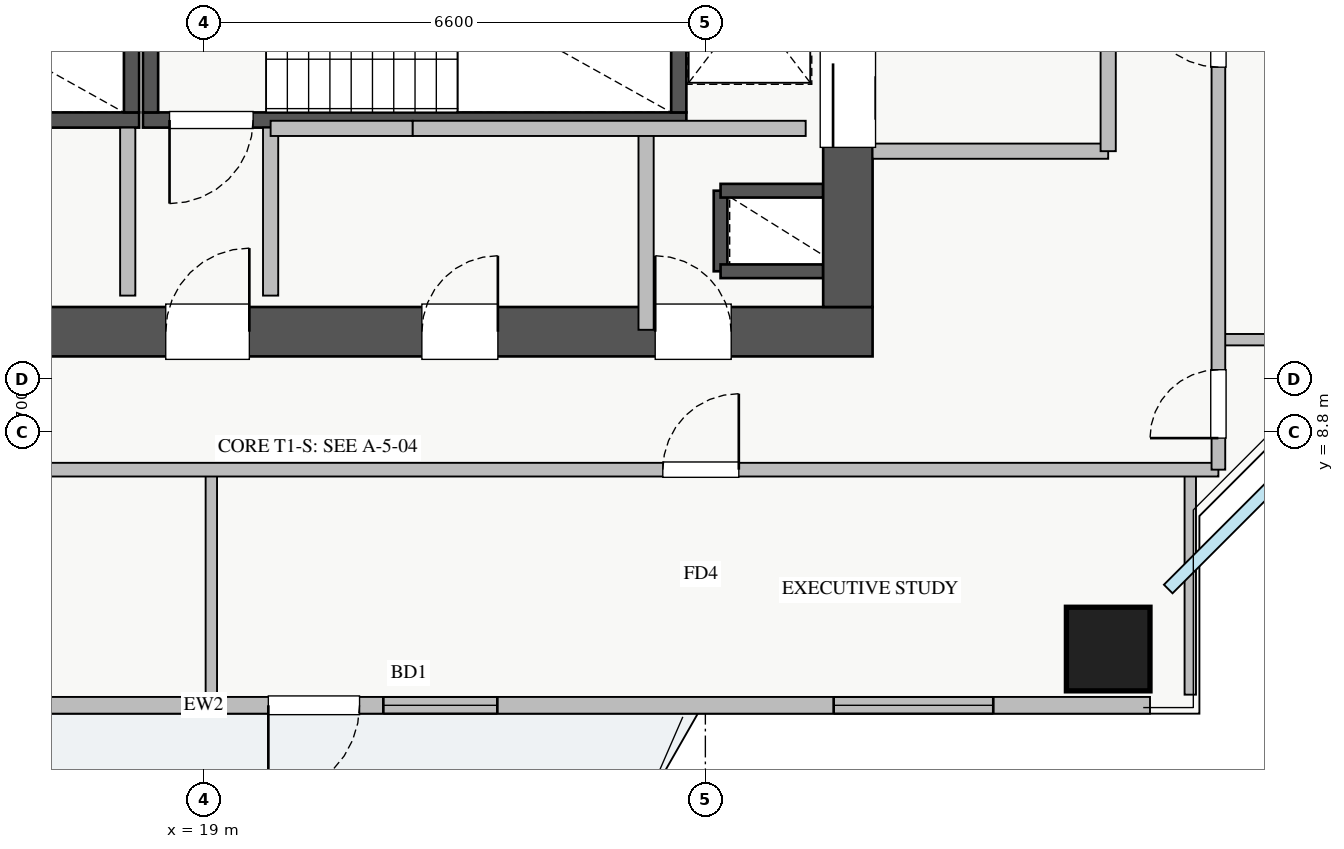
"""IFC4 building model, lengths in metres.
Left out: names, types, materials, properties, quantities, classifications, styles, units other than length and angle.
Written with IfcOpenShell. Run it as: python <this file> out.ifc"""

import sys

from ifc_helpers import new_model, si_unit, direction, frame, frame_2d, origin, origin_2d, place, context, subcontext, project, spatial, rectangle, extrude, source, transform, mapped, element, fill, save


model = new_model("IFC4")
c1 = context("Model", 3, precision=1e-05, world=origin(), true_north=direction((0.0, 1.0)))
c2 = subcontext(c1, "Body", "Model", "MODEL_VIEW")
j1 = project(units=[si_unit("LENGTHUNIT", "METRE"), si_unit("PLANEANGLEUNIT", "RADIAN")], contexts=[c1])
p1 = place(None, origin())
s1 = spatial("IfcSite", under=j1, at=p1, CompositionType="ELEMENT")
p2 = place(p1, origin())
s2 = spatial("IfcBuilding", under=s1, at=p2, CompositionType="ELEMENT")
p3 = place(p2, frame((0.0, 0.0, 126.25)))
s3 = spatial("IfcBuildingStorey", under=s2, at=p3, CompositionType="ELEMENT", Elevation=126.25)
p4 = place(p3, frame((25.8, 10.92, 0.0), z_axis=(0.0, 0.0, 1.0), x_axis=(0.0, 1.0, 0.0)))
e1 = element("IfcWall", 1, at=p4, inside=s3, PredefinedType="SHEAR", context=c2, shape_type="SweptSolid", body=[
    extrude(rectangle(XDim=1.06, YDim=0.18, at=frame_2d((0.53, 0.0))), origin(), (0.0, 0.0, 1.0), 3.07),
])
for number, where, z_axis, x_axis in (
    (2, (25.8, 11.98, 0.0), (0.0, 0.0, 1.0), (1.0, 0.0, 0.0)),
    (3, (25.8, 10.92, 0.0), (0.0, 0.0, 1.0), (1.0, 0.0, 0.0)),
):
    element("IfcWall", number, at=place(p3, frame(where, z_axis=z_axis, x_axis=x_axis)), inside=s3, PredefinedType="SHEAR", context=c2, shape_type="SweptSolid", body=[
        extrude(rectangle(XDim=1.35, YDim=0.18, at=frame_2d((0.675, 0.0))), origin(), (0.0, 0.0, 1.0), 3.07),
    ])
p5 = place(p3, frame((10.85, 12.91, 0.0), z_axis=(0.0, 0.0, 1.0), x_axis=(1.0, 0.0, 0.0)))
e4 = element("IfcWall", 4, at=p5, inside=s3, PredefinedType="SHEAR", context=c2, shape_type="SweptSolid", body=[
    extrude(rectangle(XDim=7.3, YDim=0.2, at=frame_2d((3.65, 0.0))), origin(), (0.0, 0.0, 1.0), 3.25),
])
p6 = place(p5, frame((0.35, 0.0, 0.0)))
e5 = element("IfcOpeningElement", 5, at=p6, cuts=e4, PredefinedType="OPENING", context=c2, shape_type="SweptSolid", body=[
    extrude(rectangle(XDim=1.1, YDim=2.05, at=frame_2d((0.55, 1.025))), frame((0.0, 0.11, 0.0), z_axis=(0.0, -1.0, 0.0), x_axis=(1.0, 0.0, 0.0)), (0.0, 0.0, 1.0), 0.22),
])
p7 = place(p3, frame((18.05, 13.01, 0.0), z_axis=(0.0, 0.0, 1.0), x_axis=(0.0, 1.0, 0.0)))
e6 = element("IfcWall", 6, at=p7, inside=s3, PredefinedType="SHEAR", context=c2, shape_type="SweptSolid", body=[
    extrude(rectangle(XDim=2.94, YDim=0.2, at=frame_2d((1.47, 0.0))), origin(), (0.0, 0.0, 1.0), 3.25),
])
p8 = place(p3, frame((18.2, 12.91, 0.0), z_axis=(0.0, 0.0, 1.0), x_axis=(1.0, 0.0, 0.0)))
e7 = element("IfcWall", 7, at=p8, inside=s3, PredefinedType="SHEAR", context=c2, shape_type="SweptSolid", body=[
    extrude(rectangle(XDim=7.15, YDim=0.2, at=frame_2d((3.575, 0.0))), origin(), (0.0, 0.0, 1.0), 3.25),
])
p9 = place(p8, frame((0.35, 0.0, 0.0)))
e8 = element("IfcOpeningElement", 8, at=p9, cuts=e7, PredefinedType="OPENING", context=c2, shape_type="SweptSolid", body=[
    extrude(rectangle(XDim=1.1, YDim=2.05, at=frame_2d((0.55, 1.025))), frame((0.0, 0.11, 0.0), z_axis=(0.0, -1.0, 0.0), x_axis=(1.0, 0.0, 0.0)), (0.0, 0.0, 1.0), 0.22),
])
for number, where, z_axis, x_axis in (
    (9, (18.3, 13.01, 0.0), (0.0, 0.0, 1.0), (0.0, 1.0, 0.0)),
    (10, (25.25, 13.01, 0.0), (0.0, 0.0, 1.0), (0.0, 1.0, 0.0)),
):
    element("IfcWall", number, at=place(p3, frame(where, z_axis=z_axis, x_axis=x_axis)), inside=s3, PredefinedType="SHEAR", context=c2, shape_type="SweptSolid", body=[
        extrude(rectangle(XDim=2.94, YDim=0.2, at=frame_2d((1.47, 0.0))), origin(), (0.0, 0.0, 1.0), 3.25),
    ])
p10 = place(p3, frame((10.2, 10.125, 0.0), z_axis=(0.0, 0.0, 1.0), x_axis=(1.0, 0.0, 0.0)))
e11 = element("IfcWall", 11, at=p10, inside=s3, PredefinedType="SHEAR", context=c2, shape_type="SweptSolid", body=[
    extrude(rectangle(XDim=17.6, YDim=0.65, at=frame_2d((8.8, 0.0))), origin(), (0.0, 0.0, 1.0), 3.25),
])
p11 = place(p10, frame((1.15, 0.0, 0.0)))
e12 = element("IfcOpeningElement", 12, at=p11, cuts=e11, PredefinedType="OPENING", context=c2, shape_type="SweptSolid", body=[
    extrude(rectangle(XDim=1.1, YDim=2.05, at=frame_2d((0.55, 1.025))), frame((0.0, 0.335, 0.0), z_axis=(0.0, -1.0, 0.0), x_axis=(1.0, 0.0, 0.0)), (0.0, 0.0, 1.0), 0.67),
])
p12 = place(p10, frame((8.3, 0.0, 0.0)))
e13 = element("IfcOpeningElement", 13, at=p12, cuts=e11, PredefinedType="OPENING", context=c2, shape_type="SweptSolid", body=[
    extrude(rectangle(XDim=1.1, YDim=2.05, at=frame_2d((0.55, 1.025))), frame((0.0, 0.335, 0.0), z_axis=(0.0, -1.0, 0.0), x_axis=(1.0, 0.0, 0.0)), (0.0, 0.0, 1.0), 0.67),
])
p13 = place(p10, frame((4.9, 0.0, 0.0)))
e14 = element("IfcOpeningElement", 14, at=p13, cuts=e11, PredefinedType="OPENING", context=c2, shape_type="SweptSolid", body=[
    extrude(rectangle(XDim=1.1, YDim=2.05, at=frame_2d((0.55, 1.025))), frame((0.0, 0.335, 0.0), z_axis=(0.0, -1.0, 0.0), x_axis=(1.0, 0.0, 0.0)), (0.0, 0.0, 1.0), 0.67),
])
p14 = place(p10, frame((14.74, 0.0, 0.0)))
e15 = element("IfcOpeningElement", 15, at=p14, cuts=e11, PredefinedType="OPENING", context=c2, shape_type="SweptSolid", body=[
    extrude(rectangle(XDim=1.0, YDim=2.05, at=frame_2d((0.5, 1.025))), frame((0.0, 0.335, 0.0), z_axis=(0.0, -1.0, 0.0), x_axis=(1.0, 0.0, 0.0)), (0.0, 0.0, 1.0), 0.67),
])
p15 = place(p10, frame((11.67, 0.0, 0.0)))
e16 = element("IfcOpeningElement", 16, at=p15, cuts=e11, PredefinedType="OPENING", context=c2, shape_type="SweptSolid", body=[
    extrude(rectangle(XDim=1.0, YDim=2.05, at=frame_2d((0.5, 1.025))), frame((0.0, 0.335, 0.0), z_axis=(0.0, -1.0, 0.0), x_axis=(1.0, 0.0, 0.0)), (0.0, 0.0, 1.0), 0.67),
])
p16 = place(p3, frame((27.475, 10.45, 0.0), z_axis=(0.0, 0.0, 1.0), x_axis=(0.0, 1.0, 0.0)))
e17 = element("IfcWall", 17, at=p16, inside=s3, PredefinedType="SHEAR", context=c2, shape_type="SweptSolid", body=[
    extrude(rectangle(XDim=5.9, YDim=0.65, at=frame_2d((2.95, 0.0))), origin(), (0.0, 0.0, 1.0), 3.25),
])
p17 = place(p16, frame((2.1, 0.0, 0.0)))
e18 = element("IfcOpeningElement", 18, at=p17, cuts=e17, PredefinedType="OPENING", context=c2, shape_type="SweptSolid", body=[
    extrude(rectangle(XDim=1.3, YDim=2.05, at=frame_2d((0.65, 1.025))), frame((0.0, 0.335, 0.0), z_axis=(0.0, -1.0, 0.0), x_axis=(1.0, 0.0, 0.0)), (0.0, 0.0, 1.0), 0.67),
])
m1 = source(origin(), c2, "Body", "SweptSolid", [
    extrude(rectangle(XDim=1.1, YDim=1.1, at=origin_2d()), origin(), (0.0, 0.0, 1.0), 3.25),
])
p18 = place(p3, frame((30.9, 5.95, 0.0), z_axis=(0.0, 0.0, 1.0), x_axis=(1.0, 0.0, 0.0)))
e19 = element("IfcColumn", 19, at=p18, inside=s3, PredefinedType="COLUMN", context=c2, shape_type="MappedRepresentation", body=[
    mapped(m1, transform((0.0, 0.0, 0.0), x_axis=(1.0, 0.0, 0.0), y_axis=(0.0, 1.0, 0.0), z_axis=(0.0, 0.0, 1.0), scale=1.0)),
])
p19 = place(p3, frame((6.55, 5.21, 0.0), z_axis=(0.0, 0.0, 1.0), x_axis=(1.0, 0.0, 0.0)))
e20 = element("IfcWall", 20, at=p19, inside=s3, PredefinedType="STANDARD", context=c2, shape_type="SweptSolid", body=[
    extrude(rectangle(XDim=24.9, YDim=0.22, at=frame_2d((12.45, 0.0))), origin(), (0.0, 0.0, 1.0), 2.61),
])
p20 = place(p19, frame((13.3, 0.0, 0.0)))
e21 = element("IfcOpeningElement", 21, at=p20, cuts=e20, PredefinedType="OPENING", context=c2, shape_type="SweptSolid", body=[
    extrude(rectangle(XDim=1.2, YDim=2.1, at=frame_2d((0.6, 1.05))), frame((0.0, 0.12, 0.0), z_axis=(0.0, -1.0, 0.0), x_axis=(1.0, 0.0, 0.0)), (0.0, 0.0, 1.0), 0.24),
])
p21 = place(p19, frame((0.343, 0.0, 0.9)))
e22 = element("IfcOpeningElement", 22, at=p21, cuts=e20, PredefinedType="OPENING", context=c2, shape_type="SweptSolid", body=[
    extrude(rectangle(XDim=1.5, YDim=1.5, at=frame_2d((0.75, 0.75))), frame((0.0, 0.12, 0.0), z_axis=(0.0, -1.0, 0.0), x_axis=(1.0, 0.0, 0.0)), (0.0, 0.0, 1.0), 0.24),
])
p22 = place(p19, frame((8.438, 0.0, 0.9)))
e23 = element("IfcOpeningElement", 23, at=p22, cuts=e20, PredefinedType="OPENING", context=c2, shape_type="SweptSolid", body=[
    extrude(rectangle(XDim=1.8, YDim=1.45, at=frame_2d((0.9, 0.725))), frame((0.0, 0.12, 0.0), z_axis=(0.0, -1.0, 0.0), x_axis=(1.0, 0.0, 0.0)), (0.0, 0.0, 1.0), 0.24),
])
p23 = place(p19, frame((14.813, 0.0, 0.9)))
e24 = element("IfcOpeningElement", 24, at=p23, cuts=e20, PredefinedType="OPENING", context=c2, shape_type="SweptSolid", body=[
    extrude(rectangle(XDim=1.5, YDim=1.45, at=frame_2d((0.75, 0.725))), frame((0.0, 0.12, 0.0), z_axis=(0.0, -1.0, 0.0), x_axis=(1.0, 0.0, 0.0)), (0.0, 0.0, 1.0), 0.24),
])
p24 = place(p19, frame((20.738, 0.0, 0.9)))
e25 = element("IfcOpeningElement", 25, at=p24, cuts=e20, PredefinedType="OPENING", context=c2, shape_type="SweptSolid", body=[
    extrude(rectangle(XDim=2.1, YDim=1.48, at=frame_2d((1.05, 0.74))), frame((0.0, 0.12, 0.0), z_axis=(0.0, -1.0, 0.0), x_axis=(1.0, 0.0, 0.0)), (0.0, 0.0, 1.0), 0.24),
])
p25 = place(p19, frame((4.122, 0.0, 0.9)))
e26 = element("IfcOpeningElement", 26, at=p25, cuts=e20, PredefinedType="OPENING", context=c2, shape_type="SweptSolid", body=[
    extrude(rectangle(XDim=2.4, YDim=1.5, at=frame_2d((1.2, 0.75))), frame((0.0, 0.12, 0.0), z_axis=(0.0, -1.0, 0.0), x_axis=(1.0, 0.0, 0.0)), (0.0, 0.0, 1.0), 0.24),
])
p26 = place(p3, frame((27.8, 12.5, 0.0), z_axis=(0.0, 0.0, 1.0), x_axis=(1.0, 0.0, 0.0)))
e27 = element("IfcWall", 27, at=p26, inside=s3, PredefinedType="PARTITIONING", context=c2, shape_type="SweptSolid", body=[
    extrude(rectangle(XDim=3.1, YDim=0.2, at=frame_2d((1.55, 0.0))), origin(), (0.0, 0.0, 1.0), 3.07),
])
p27 = place(p3, frame((30.9, 12.5, 0.0), z_axis=(0.0, 0.0, 1.0), x_axis=(0.0, 1.0, 0.0)))
e28 = element("IfcWall", 28, at=p27, inside=s3, PredefinedType="PARTITIONING", context=c2, shape_type="SweptSolid", body=[
    extrude(rectangle(XDim=3.9, YDim=0.2, at=frame_2d((1.95, 0.0))), origin(), (0.0, 0.0, 1.0), 3.07),
])
p28 = place(p27, frame((1.4, 0.0, 0.0)))
e29 = element("IfcOpeningElement", 29, at=p28, cuts=e28, PredefinedType="OPENING", context=c2, shape_type="SweptSolid", body=[
    extrude(rectangle(XDim=1.1, YDim=2.05, at=frame_2d((0.55, 1.025))), frame((0.0, 0.11, 0.0), z_axis=(0.0, -1.0, 0.0), x_axis=(1.0, 0.0, 0.0)), (0.0, 0.0, 1.0), 0.22),
])
for number, where, z_axis, x_axis in (
    (30, (18.0, 10.6, 0.0), (0.0, 0.0, 1.0), (0.0, 1.0, 0.0)),
    (31, (19.88, 10.6, 0.0), (0.0, 0.0, 1.0), (0.0, 1.0, 0.0)),
):
    element("IfcWall", number, at=place(p3, frame(where, z_axis=z_axis, x_axis=x_axis)), inside=s3, PredefinedType="PARTITIONING", context=c2, shape_type="SweptSolid", body=[
        extrude(rectangle(XDim=2.21, YDim=0.2, at=frame_2d((1.105, 0.0))), origin(), (0.0, 0.0, 1.0), 3.07),
    ])
p29 = place(p3, frame((24.82, 10.15, 0.0), z_axis=(0.0, 0.0, 1.0), x_axis=(0.0, 1.0, 0.0)))
e32 = element("IfcWall", 32, at=p29, inside=s3, PredefinedType="PARTITIONING", context=c2, shape_type="SweptSolid", body=[
    extrude(rectangle(XDim=2.65, YDim=0.2, at=frame_2d((1.325, 0.0))), origin(), (0.0, 0.0, 1.0), 3.07),
])
p30 = place(p3, frame((19.88, 12.8, 0.0), z_axis=(0.0, 0.0, 1.0), x_axis=(1.0, 0.0, 0.0)))
e33 = element("IfcWall", 33, at=p30, inside=s3, PredefinedType="PARTITIONING", context=c2, shape_type="SweptSolid", body=[
    extrude(rectangle(XDim=1.87, YDim=0.2, at=frame_2d((0.935, 0.0))), origin(), (0.0, 0.0, 1.0), 3.07),
])
p31 = place(p3, frame((21.75, 12.8, 0.0), z_axis=(0.0, 0.0, 1.0), x_axis=(1.0, 0.0, 0.0)))
e34 = element("IfcWall", 34, at=p31, inside=s3, PredefinedType="PARTITIONING", context=c2, shape_type="SweptSolid", body=[
    extrude(rectangle(XDim=5.17, YDim=0.2, at=frame_2d((2.585, 0.0))), origin(), (0.0, 0.0, 1.0), 3.07),
])
p32 = place(p3, frame((19.1, 5.35, 0.0), z_axis=(0.0, 0.0, 1.0), x_axis=(0.0, 1.0, 0.0)))
e35 = element("IfcWall", 35, at=p32, inside=s3, PredefinedType="PARTITIONING", context=c2, shape_type="SweptSolid", body=[
    extrude(rectangle(XDim=2.96, YDim=0.15, at=frame_2d((1.48, 0.0))), origin(), (0.0, 0.0, 1.0), 2.715),
])
p33 = place(p3, frame((31.98, 5.35, 0.0), z_axis=(0.0, 0.0, 1.0), x_axis=(0.0, 1.0, 0.0)))
e36 = element("IfcWall", 36, at=p33, inside=s3, PredefinedType="PARTITIONING", context=c2, shape_type="SweptSolid", body=[
    extrude(rectangle(XDim=2.96, YDim=0.15, at=frame_2d((1.48, 0.0))), origin(), (0.0, 0.0, 1.0), 3.07),
])
p34 = place(p3, frame((8.72, 8.31, 0.0), z_axis=(0.0, 0.0, 1.0), x_axis=(1.0, 0.0, 0.0)))
e37 = element("IfcWall", 37, at=p34, inside=s3, PredefinedType="PARTITIONING", context=c2, shape_type="SweptSolid", body=[
    extrude(rectangle(XDim=23.63, YDim=0.18, at=frame_2d((11.815, 0.0))), origin(), (0.0, 0.0, 1.0), 3.07),
])
p35 = place(p34, frame((4.69, 0.0, 0.0)))
e38 = element("IfcOpeningElement", 38, at=p35, cuts=e37, PredefinedType="OPENING", context=c2, shape_type="SweptSolid", body=[
    extrude(rectangle(XDim=1.0, YDim=2.05, at=frame_2d((0.5, 1.025))), frame((0.0, 0.1, 0.0), z_axis=(0.0, -1.0, 0.0), x_axis=(1.0, 0.0, 0.0)), (0.0, 0.0, 1.0), 0.2),
])
p36 = place(p34, frame((16.32, 0.0, 0.0)))
e39 = element("IfcOpeningElement", 39, at=p36, cuts=e37, PredefinedType="OPENING", context=c2, shape_type="SweptSolid", body=[
    extrude(rectangle(XDim=1.0, YDim=2.05, at=frame_2d((0.5, 1.025))), frame((0.0, 0.1, 0.0), z_axis=(0.0, -1.0, 0.0), x_axis=(1.0, 0.0, 0.0)), (0.0, 0.0, 1.0), 0.2),
])
p37 = place(p3, frame((32.35, 10.02, 0.0), z_axis=(0.0, 0.0, 1.0), x_axis=(1.0, 0.0, 0.0)))
e40 = element("IfcWall", 40, at=p37, inside=s3, PredefinedType="PARTITIONING", context=c2, shape_type="SweptSolid", body=[
    extrude(rectangle(XDim=4.3, YDim=0.15, at=frame_2d((2.15, 0.0))), origin(), (0.0, 0.0, 1.0), 3.07),
])
p38 = place(p3, frame((32.35, 8.31, 0.0), z_axis=(0.0, 0.0, 1.0), x_axis=(0.0, 1.0, 0.0)))
e41 = element("IfcWall", 41, at=p38, inside=s3, PredefinedType="PARTITIONING", context=c2, shape_type="SweptSolid", body=[
    extrude(rectangle(XDim=29.37, YDim=0.18, at=frame_2d((14.685, 0.0))), origin(), (0.0, 0.0, 1.0), 3.07),
])
p39 = place(p38, frame((28.06, 0.0, 0.0)))
e42 = element("IfcOpeningElement", 42, at=p39, cuts=e41, PredefinedType="OPENING", context=c2, shape_type="SweptSolid", body=[
    extrude(rectangle(XDim=0.9, YDim=2.05, at=frame_2d((0.45, 1.025))), frame((0.0, 0.1, 0.0), z_axis=(0.0, -1.0, 0.0), x_axis=(1.0, 0.0, 0.0)), (0.0, 0.0, 1.0), 0.2),
])
p40 = place(p38, frame((0.415, 0.0, 0.0)))
e43 = element("IfcOpeningElement", 43, at=p40, cuts=e41, PredefinedType="OPENING", context=c2, shape_type="SweptSolid", body=[
    extrude(rectangle(XDim=0.9, YDim=2.05, at=frame_2d((0.45, 1.025))), frame((0.0, 0.1, 0.0), z_axis=(0.0, -1.0, 0.0), x_axis=(1.0, 0.0, 0.0)), (0.0, 0.0, 1.0), 0.2),
])
p41 = place(p38, frame((5.295, 0.0, 0.0)))
e44 = element("IfcOpeningElement", 44, at=p41, cuts=e41, PredefinedType="OPENING", context=c2, shape_type="SweptSolid", body=[
    extrude(rectangle(XDim=1.0, YDim=2.05, at=frame_2d((0.5, 1.025))), frame((0.0, 0.1, 0.0), z_axis=(0.0, -1.0, 0.0), x_axis=(1.0, 0.0, 0.0)), (0.0, 0.0, 1.0), 0.2),
])
p42 = place(p38, frame((11.645, 0.0, 0.0)))
e45 = element("IfcOpeningElement", 45, at=p42, cuts=e41, PredefinedType="OPENING", context=c2, shape_type="SweptSolid", body=[
    extrude(rectangle(XDim=1.0, YDim=2.05, at=frame_2d((0.5, 1.025))), frame((0.0, 0.1, 0.0), z_axis=(0.0, -1.0, 0.0), x_axis=(1.0, 0.0, 0.0)), (0.0, 0.0, 1.0), 0.2),
])
p43 = place(p38, frame((20.835, 0.0, 0.0)))
e46 = element("IfcOpeningElement", 46, at=p43, cuts=e41, PredefinedType="OPENING", context=c2, shape_type="SweptSolid", body=[
    extrude(rectangle(XDim=1.0, YDim=2.05, at=frame_2d((0.5, 1.025))), frame((0.0, 0.1, 0.0), z_axis=(0.0, -1.0, 0.0), x_axis=(1.0, 0.0, 0.0)), (0.0, 0.0, 1.0), 0.2),
])
m2 = source(origin(), c2, "Body", "SweptSolid", [
    extrude(rectangle(XDim=1.2, YDim=2.1, at=frame_2d((0.6, 1.05))), frame((0.0, 0.025, 0.0), z_axis=(0.0, -1.0, 0.0), x_axis=(1.0, 0.0, 0.0)), (0.0, 0.0, 1.0), 0.05),
])
p44 = place(p20, frame((1.2, 0.0, 0.0), z_axis=(0.0, 0.0, 1.0), x_axis=(-1.0, 0.0, 0.0)))
e47 = element("IfcDoor", 47, at=p44, inside=s3, OperationType="SINGLE_SWING_LEFT", PredefinedType="DOOR", context=c2, shape_type="MappedRepresentation", body=[
    mapped(m2, transform((0.0, 0.0, 0.0), x_axis=(1.0, 0.0, 0.0), y_axis=(0.0, 1.0, 0.0), z_axis=(0.0, 0.0, 1.0), scale=1.0)),
])
fill(e21, e47)
m3 = source(origin(), c2, "Body", "SweptSolid", [
    extrude(rectangle(XDim=1.5, YDim=1.45, at=frame_2d((0.75, 0.725))), frame((0.0, 0.03, 0.0), z_axis=(0.0, -1.0, 0.0), x_axis=(1.0, 0.0, 0.0)), (0.0, 0.0, 1.0), 0.06),
])
p45 = place(p23, origin())
e48 = element("IfcWindow", 48, at=p45, inside=s3, PartitioningType="DOUBLE_PANEL_VERTICAL", PredefinedType="WINDOW", context=c2, shape_type="MappedRepresentation", body=[
    mapped(m3, transform((0.0, 0.0, 0.0), x_axis=(1.0, 0.0, 0.0), y_axis=(0.0, 1.0, 0.0), z_axis=(0.0, 0.0, 1.0), scale=1.0)),
])
fill(e24, e48)
m4 = source(origin(), c2, "Body", "SweptSolid", [
    extrude(rectangle(XDim=2.1, YDim=1.48, at=frame_2d((1.05, 0.74))), frame((0.0, 0.03, 0.0), z_axis=(0.0, -1.0, 0.0), x_axis=(1.0, 0.0, 0.0)), (0.0, 0.0, 1.0), 0.06),
])
p46 = place(p24, origin())
e49 = element("IfcWindow", 49, at=p46, inside=s3, PartitioningType="TRIPLE_PANEL_VERTICAL", PredefinedType="WINDOW", context=c2, shape_type="MappedRepresentation", body=[
    mapped(m4, transform((0.0, 0.0, 0.0), x_axis=(1.0, 0.0, 0.0), y_axis=(0.0, 1.0, 0.0), z_axis=(0.0, 0.0, 1.0), scale=1.0)),
])
fill(e25, e49)
m5 = source(origin(), c2, "Body", "SweptSolid", [
    extrude(rectangle(XDim=1.3, YDim=2.05, at=frame_2d((0.65, 1.025))), frame((0.0, 0.025, 0.0), z_axis=(0.0, -1.0, 0.0), x_axis=(1.0, 0.0, 0.0)), (0.0, 0.0, 1.0), 0.05),
])
p47 = place(p17, origin())
e50 = element("IfcDoor", 50, at=p47, inside=s3, OperationType="SLIDING_TO_RIGHT", PredefinedType="DOOR", context=c2, shape_type="MappedRepresentation", body=[
    mapped(m5, transform((0.0, 0.0, 0.0), x_axis=(1.0, 0.0, 0.0), y_axis=(0.0, 1.0, 0.0), z_axis=(0.0, 0.0, 1.0), scale=1.0)),
])
fill(e18, e50)
m6 = source(origin(), c2, "Body", "SweptSolid", [
    extrude(rectangle(XDim=1.1, YDim=2.05, at=frame_2d((0.55, 1.025))), frame((0.0, 0.025, 0.0), z_axis=(0.0, -1.0, 0.0), x_axis=(1.0, 0.0, 0.0)), (0.0, 0.0, 1.0), 0.05),
])
p48 = place(p12, origin())
e51 = element("IfcDoor", 51, at=p48, inside=s3, OperationType="SINGLE_SWING_RIGHT", PredefinedType="DOOR", context=c2, shape_type="MappedRepresentation", body=[
    mapped(m6, transform((0.0, 0.0, 0.0), x_axis=(1.0, 0.0, 0.0), y_axis=(0.0, 1.0, 0.0), z_axis=(0.0, 0.0, 1.0), scale=1.0)),
])
fill(e13, e51)
p49 = place(p9, frame((1.1, 0.0, 0.0), z_axis=(0.0, 0.0, 1.0), x_axis=(-1.0, 0.0, 0.0)))
e52 = element("IfcDoor", 52, at=p49, inside=s3, OperationType="SINGLE_SWING_LEFT", PredefinedType="DOOR", context=c2, shape_type="MappedRepresentation", body=[
    mapped(m6, transform((0.0, 0.0, 0.0), x_axis=(1.0, 0.0, 0.0), y_axis=(0.0, 1.0, 0.0), z_axis=(0.0, 0.0, 1.0), scale=1.0)),
])
fill(e8, e52)
m7 = source(origin(), c2, "Body", "SweptSolid", [
    extrude(rectangle(XDim=1.0, YDim=2.05, at=frame_2d((0.5, 1.025))), frame((0.0, 0.025, 0.0), z_axis=(0.0, -1.0, 0.0), x_axis=(1.0, 0.0, 0.0)), (0.0, 0.0, 1.0), 0.05),
])
p50 = place(p14, origin())
e53 = element("IfcDoor", 53, at=p50, inside=s3, OperationType="SINGLE_SWING_LEFT", PredefinedType="DOOR", context=c2, shape_type="MappedRepresentation", body=[
    mapped(m7, transform((0.0, 0.0, 0.0), x_axis=(1.0, 0.0, 0.0), y_axis=(0.0, 1.0, 0.0), z_axis=(0.0, 0.0, 1.0), scale=1.0)),
])
fill(e15, e53)
p51 = place(p15, origin())
e54 = element("IfcDoor", 54, at=p51, inside=s3, OperationType="SINGLE_SWING_RIGHT", PredefinedType="DOOR", context=c2, shape_type="MappedRepresentation", body=[
    mapped(m7, transform((0.0, 0.0, 0.0), x_axis=(1.0, 0.0, 0.0), y_axis=(0.0, 1.0, 0.0), z_axis=(0.0, 0.0, 1.0), scale=1.0)),
])
fill(e16, e54)
p52 = place(p36, origin())
e55 = element("IfcDoor", 55, at=p52, inside=s3, OperationType="SINGLE_SWING_RIGHT", PredefinedType="DOOR", context=c2, shape_type="MappedRepresentation", body=[
    mapped(m7, transform((0.0, 0.0, 0.0), x_axis=(1.0, 0.0, 0.0), y_axis=(0.0, 1.0, 0.0), z_axis=(0.0, 0.0, 1.0), scale=1.0)),
])
fill(e39, e55)
m8 = source(origin(), c2, "Body", "SweptSolid", [
    extrude(rectangle(XDim=0.9, YDim=2.05, at=frame_2d((0.45, 1.025))), frame((0.0, 0.025, 0.0), z_axis=(0.0, -1.0, 0.0), x_axis=(1.0, 0.0, 0.0)), (0.0, 0.0, 1.0), 0.05),
])
p53 = place(p40, origin())
e56 = element("IfcDoor", 56, at=p53, inside=s3, OperationType="SINGLE_SWING_LEFT", PredefinedType="DOOR", context=c2, shape_type="MappedRepresentation", body=[
    mapped(m8, transform((0.0, 0.0, 0.0), x_axis=(1.0, 0.0, 0.0), y_axis=(0.0, 1.0, 0.0), z_axis=(0.0, 0.0, 1.0), scale=1.0)),
])
fill(e43, e56)
p54 = place(p41, origin())
e57 = element("IfcDoor", 57, at=p54, inside=s3, OperationType="SINGLE_SWING_RIGHT", PredefinedType="DOOR", context=c2, shape_type="MappedRepresentation", body=[
    mapped(m7, transform((0.0, 0.0, 0.0), x_axis=(1.0, 0.0, 0.0), y_axis=(0.0, 1.0, 0.0), z_axis=(0.0, 0.0, 1.0), scale=1.0)),
])
fill(e44, e57)
save(model, sys.argv[1])
